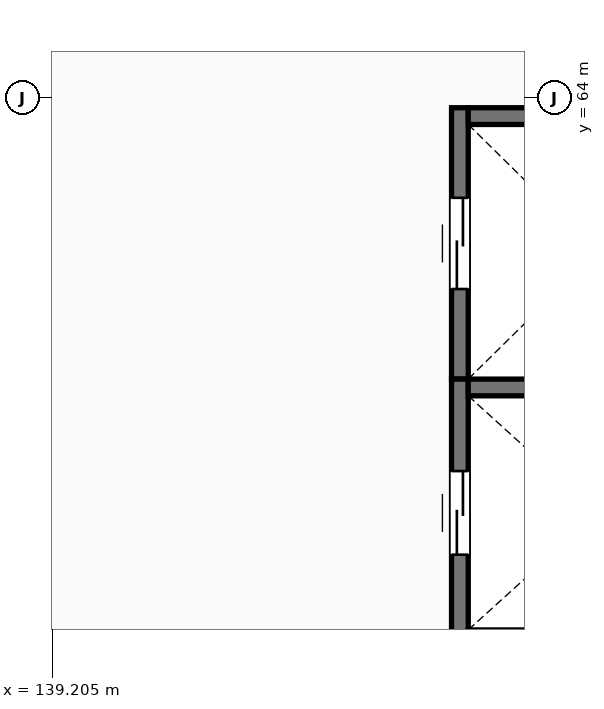
"""IFC4 building model, lengths in metres.
Left out: names, types, materials, properties, quantities, classifications, styles, units other than length and angle.
Written with IfcOpenShell. Run it as: python <this file> out.ifc"""

import sys

from ifc_helpers import new_model, si_unit, direction, frame, frame_2d, origin, place, context, subcontext, project, spatial, rectangle, extrude, element, fill, save


model = new_model("IFC4")
c1 = context("Model", 3, precision=1e-05, world=origin(), true_north=direction((0.0, 1.0)))
c2 = subcontext(c1, "Body", "Model", "MODEL_VIEW")
j1 = project(units=[si_unit("LENGTHUNIT", "METRE"), si_unit("PLANEANGLEUNIT", "RADIAN")], contexts=[c1])
p1 = place(None, origin())
s1 = spatial("IfcSite", under=j1, at=p1, CompositionType="ELEMENT")
p2 = place(p1, origin())
s2 = spatial("IfcBuilding", under=s1, at=p2, CompositionType="ELEMENT")
p3 = place(p2, frame((0.0, 0.0, 15.6)))
s3 = spatial("IfcBuildingStorey", under=s2, at=p3, CompositionType="ELEMENT", Elevation=15.6)
p4 = place(p3, frame((144.57, 60.3, 0.0), z_axis=(0.0, 0.0, 1.0), x_axis=(0.0, 1.0, 0.0)))
e1 = element("IfcWall", 1, at=p4, inside=s3, PredefinedType="SHEAR", context=c2, shape_type="SweptSolid", body=[
    extrude(rectangle(XDim=3.57, YDim=0.22, at=frame_2d((1.785, 0.0))), origin(), (0.0, 0.0, 1.0), 3.6),
])
p5 = place(p4, frame((1.185, 0.0, 0.0)))
e2 = element("IfcOpeningElement", 2, at=p5, cuts=e1, PredefinedType="OPENING", context=c2, shape_type="SweptSolid", body=[
    extrude(rectangle(XDim=1.2, YDim=2.2, at=frame_2d((0.6, 1.1))), frame((0.0, 0.12, 0.0), z_axis=(0.0, -1.0, 0.0), x_axis=(1.0, 0.0, 0.0)), (0.0, 0.0, 1.0), 0.24),
])
p6 = place(p3, frame((144.68, 63.76, 0.0), z_axis=(0.0, 0.0, 1.0), x_axis=(1.0, 0.0, 0.0)))
e3 = element("IfcWall", 3, at=p6, inside=s3, PredefinedType="SHEAR", context=c2, shape_type="SweptSolid", body=[
    extrude(rectangle(XDim=3.4, YDim=0.22, at=frame_2d((1.7, 0.0))), origin(), (0.0, 0.0, 1.0), 3.6),
])
p7 = place(p3, frame((144.57, 56.78, 0.0), z_axis=(0.0, 0.0, 1.0), x_axis=(0.0, 1.0, 0.0)))
e4 = element("IfcWall", 4, at=p7, inside=s3, PredefinedType="SHEAR", context=c2, shape_type="SweptSolid", body=[
    extrude(rectangle(XDim=3.52, YDim=0.22, at=frame_2d((1.76, 0.0))), origin(), (0.0, 0.0, 1.0), 3.6),
])
p8 = place(p7, frame((1.21, 0.0, 0.0)))
e5 = element("IfcOpeningElement", 5, at=p8, cuts=e4, PredefinedType="OPENING", context=c2, shape_type="SweptSolid", body=[
    extrude(rectangle(XDim=1.1, YDim=2.2, at=frame_2d((0.55, 1.1))), frame((0.0, 0.12, 0.0), z_axis=(0.0, -1.0, 0.0), x_axis=(1.0, 0.0, 0.0)), (0.0, 0.0, 1.0), 0.24),
])
p9 = place(p3, frame((144.68, 60.19, 0.0), z_axis=(0.0, 0.0, 1.0), x_axis=(1.0, 0.0, 0.0)))
e6 = element("IfcWall", 6, at=p9, inside=s3, PredefinedType="SHEAR", context=c2, shape_type="SweptSolid", body=[
    extrude(rectangle(XDim=3.4, YDim=0.22, at=frame_2d((1.7, 0.0))), origin(), (0.0, 0.0, 1.0), 3.6),
])
p10 = place(p5, origin())
e7 = element("IfcDoor", 7, at=p10, inside=s3, OperationType="DOUBLE_DOOR_SLIDING", PredefinedType="DOOR", context=c2, shape_type="SweptSolid", body=[
    extrude(rectangle(XDim=1.2, YDim=2.2, at=frame_2d((0.6, 1.1))), frame((0.0, 0.025, 0.0), z_axis=(0.0, -1.0, 0.0), x_axis=(1.0, 0.0, 0.0)), (0.0, 0.0, 1.0), 0.05),
])
fill(e2, e7)
p11 = place(p8, origin())
e8 = element("IfcDoor", 8, at=p11, inside=s3, OperationType="DOUBLE_DOOR_SLIDING", PredefinedType="DOOR", context=c2, shape_type="SweptSolid", body=[
    extrude(rectangle(XDim=1.1, YDim=2.2, at=frame_2d((0.55, 1.1))), frame((0.0, 0.025, 0.0), z_axis=(0.0, -1.0, 0.0), x_axis=(1.0, 0.0, 0.0)), (0.0, 0.0, 1.0), 0.05),
])
fill(e5, e8)
save(model, sys.argv[1])
